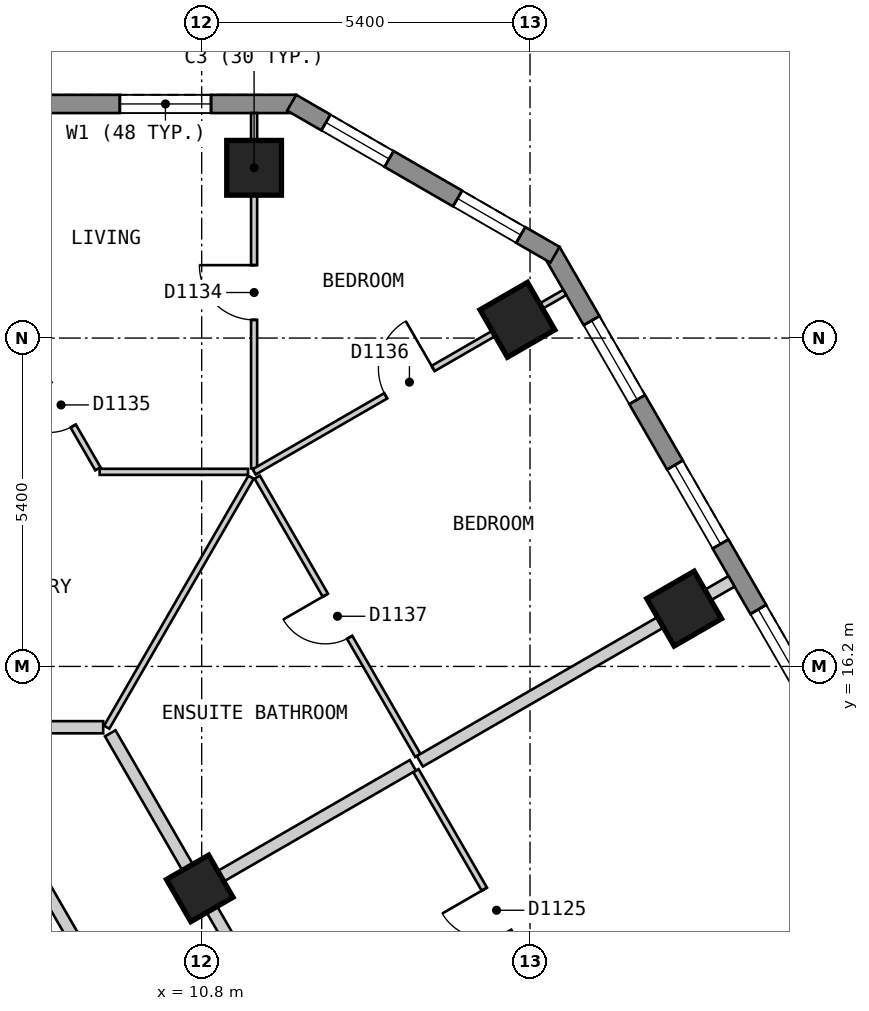
"""IFC4 building model, lengths in metres.
Left out: names, types, materials, properties, quantities, classifications, styles, units other than length and angle.
Written with IfcOpenShell. Run it as: python <this file> out.ifc"""

import sys

from ifc_helpers import new_model, si_unit, direction, frame, frame_2d, origin, origin_2d, place, context, subcontext, project, spatial, polyline, rectangle, outline, extrude, element, fill, save


model = new_model("IFC4")
c1 = context("Model", 3, precision=1e-05, world=origin(), true_north=direction((0.0, 1.0)))
c2 = subcontext(c1, "Body", "Model", "MODEL_VIEW")
j1 = project(units=[si_unit("LENGTHUNIT", "METRE"), si_unit("PLANEANGLEUNIT", "RADIAN")], contexts=[c1])
p1 = place(None, origin())
s1 = spatial("IfcSite", under=j1, at=p1, CompositionType="ELEMENT")
p2 = place(p1, origin())
s2 = spatial("IfcBuilding", under=s1, at=p2, CompositionType="ELEMENT")
p3 = place(p2, frame((0.0, 0.0, 144.6)))
s3 = spatial("IfcBuildingStorey", under=s2, at=p3, CompositionType="ELEMENT", Elevation=144.6)
for number, where, z_axis, x_axis in (
    (1, (11.662, 24.4, 0.0), (0.0, 0.0, 1.0), (-1.0, 0.0, 0.0)),
    (2, (18.735, 17.15, 0.0), (0.0, 0.0, 1.0), (-0.5, 0.866, 0.0)),
    (3, (15.993, 21.9, 0.0), (0.0, 0.0, 1.0), (-0.5, 0.866, 0.0)),
):
    element("IfcColumn", number, at=place(p3, frame(where, z_axis=z_axis, x_axis=x_axis)), inside=s3, PredefinedType="COLUMN", context=c2, shape_type="SweptSolid", body=[
        extrude(rectangle(XDim=0.9, YDim=0.9, at=origin_2d()), origin(), (0.0, 0.0, 1.0), 3.0),
    ])
p4 = place(p3, frame((10.768, 12.55, 0.0), z_axis=(0.0, 0.0, 1.0), x_axis=(-0.5, 0.866025403784, 0.0)))
e4 = element("IfcColumn", 4, at=p4, inside=s3, PredefinedType="COLUMN", context=c2, shape_type="SweptSolid", body=[
    extrude(rectangle(XDim=0.8, YDim=0.8, at=origin_2d()), origin(), (0.0, 0.0, 1.0), 3.0),
])
p5 = place(p3, frame((12.355, 25.45, 0.0), z_axis=(0.0, 0.0, 1.0), x_axis=(-1.0, 0.0, 0.0)))
e5 = element("IfcWall", 5, at=p5, inside=s3, PredefinedType="SOLIDWALL", context=c2, shape_type="SweptSolid", body=[
    extrude(outline(polyline([(0.0, -0.15), (24.71, -0.15), (24.63, 0.15), (0.08, 0.15), (0.0, -0.15)])), origin(), (0.0, 0.0, 1.0), 2.7),
])
p6 = place(p5, frame((1.401, 0.0, 0.15)))
e6 = element("IfcOpeningElement", 6, at=p6, cuts=e5, PredefinedType="OPENING", context=c2, shape_type="SweptSolid", body=[
    extrude(rectangle(XDim=1.5, YDim=2.1, at=frame_2d((0.75, 1.05))), frame((0.0, 0.16, 0.0), z_axis=(0.0, -1.0, 0.0), x_axis=(1.0, 0.0, 0.0)), (0.0, 0.0, 1.0), 0.32),
])
p7 = place(p5, frame((4.316, 0.0, 0.15)))
e7 = element("IfcOpeningElement", 7, at=p7, cuts=e5, PredefinedType="OPENING", context=c2, shape_type="SweptSolid", body=[
    extrude(rectangle(XDim=1.5, YDim=2.1, at=frame_2d((0.75, 1.05))), frame((0.0, 0.16, 0.0), z_axis=(0.0, -1.0, 0.0), x_axis=(1.0, 0.0, 0.0)), (0.0, 0.0, 1.0), 0.32),
])
p8 = place(p5, frame((7.232, 0.0, 0.15)))
e8 = element("IfcOpeningElement", 8, at=p8, cuts=e5, PredefinedType="OPENING", context=c2, shape_type="SweptSolid", body=[
    extrude(rectangle(XDim=1.5, YDim=2.1, at=frame_2d((0.75, 1.05))), frame((0.0, 0.16, 0.0), z_axis=(0.0, -1.0, 0.0), x_axis=(1.0, 0.0, 0.0)), (0.0, 0.0, 1.0), 0.32),
])
p9 = place(p5, frame((10.147, 0.0, 0.15)))
e9 = element("IfcOpeningElement", 9, at=p9, cuts=e5, PredefinedType="OPENING", context=c2, shape_type="SweptSolid", body=[
    extrude(rectangle(XDim=1.5, YDim=2.1, at=frame_2d((0.75, 1.05))), frame((0.0, 0.16, 0.0), z_axis=(0.0, -1.0, 0.0), x_axis=(1.0, 0.0, 0.0)), (0.0, 0.0, 1.0), 0.32),
])
p10 = place(p5, frame((13.063, 0.0, 0.15)))
e10 = element("IfcOpeningElement", 10, at=p10, cuts=e5, PredefinedType="OPENING", context=c2, shape_type="SweptSolid", body=[
    extrude(rectangle(XDim=1.5, YDim=2.1, at=frame_2d((0.75, 1.05))), frame((0.0, 0.16, 0.0), z_axis=(0.0, -1.0, 0.0), x_axis=(1.0, 0.0, 0.0)), (0.0, 0.0, 1.0), 0.32),
])
p11 = place(p5, frame((15.978, 0.0, 0.15)))
e11 = element("IfcOpeningElement", 11, at=p11, cuts=e5, PredefinedType="OPENING", context=c2, shape_type="SweptSolid", body=[
    extrude(rectangle(XDim=1.5, YDim=2.1, at=frame_2d((0.75, 1.05))), frame((0.0, 0.16, 0.0), z_axis=(0.0, -1.0, 0.0), x_axis=(1.0, 0.0, 0.0)), (0.0, 0.0, 1.0), 0.32),
])
p12 = place(p5, frame((18.894, 0.0, 0.15)))
e12 = element("IfcOpeningElement", 12, at=p12, cuts=e5, PredefinedType="OPENING", context=c2, shape_type="SweptSolid", body=[
    extrude(rectangle(XDim=1.5, YDim=2.1, at=frame_2d((0.75, 1.05))), frame((0.0, 0.16, 0.0), z_axis=(0.0, -1.0, 0.0), x_axis=(1.0, 0.0, 0.0)), (0.0, 0.0, 1.0), 0.32),
])
p13 = place(p5, frame((21.809, 0.0, 0.15)))
e13 = element("IfcOpeningElement", 13, at=p13, cuts=e5, PredefinedType="OPENING", context=c2, shape_type="SweptSolid", body=[
    extrude(rectangle(XDim=1.5, YDim=2.1, at=frame_2d((0.75, 1.05))), frame((0.0, 0.16, 0.0), z_axis=(0.0, -1.0, 0.0), x_axis=(1.0, 0.0, 0.0)), (0.0, 0.0, 1.0), 0.32),
])
p14 = place(p3, frame((28.218, 2.825, 0.0), z_axis=(0.0, 0.0, 1.0), x_axis=(-0.500020536353, 0.866013546791, 0.0)))
e14 = element("IfcWall", 14, at=p14, inside=s3, PredefinedType="SOLIDWALL", context=c2, shape_type="SweptSolid", body=[
    extrude(outline(polyline([(0.0, -0.15), (23.325, -0.15), (23.245, 0.15), (0.08, 0.15), (0.0, -0.15)])), origin(), (0.0, 0.0, 1.0), 2.7),
])
p15 = place(p14, frame((1.314, 0.0, 0.15)))
e15 = element("IfcOpeningElement", 15, at=p15, cuts=e14, PredefinedType="OPENING", context=c2, shape_type="SweptSolid", body=[
    extrude(rectangle(XDim=1.5, YDim=2.1, at=frame_2d((0.75, 1.05))), frame((0.0, 0.16, 0.0), z_axis=(0.0, -1.0, 0.0), x_axis=(1.0, 0.0, 0.0)), (0.0, 0.0, 1.0), 0.32),
])
p16 = place(p14, frame((4.056, 0.0, 0.15)))
e16 = element("IfcOpeningElement", 16, at=p16, cuts=e14, PredefinedType="OPENING", context=c2, shape_type="SweptSolid", body=[
    extrude(rectangle(XDim=1.5, YDim=2.1, at=frame_2d((0.75, 1.05))), frame((0.0, 0.16, 0.0), z_axis=(0.0, -1.0, 0.0), x_axis=(1.0, 0.0, 0.0)), (0.0, 0.0, 1.0), 0.32),
])
p17 = place(p14, frame((6.798, 0.0, 0.15)))
e17 = element("IfcOpeningElement", 17, at=p17, cuts=e14, PredefinedType="OPENING", context=c2, shape_type="SweptSolid", body=[
    extrude(rectangle(XDim=1.5, YDim=2.1, at=frame_2d((0.75, 1.05))), frame((0.0, 0.16, 0.0), z_axis=(0.0, -1.0, 0.0), x_axis=(1.0, 0.0, 0.0)), (0.0, 0.0, 1.0), 0.32),
])
p18 = place(p14, frame((9.541, 0.0, 0.15)))
e18 = element("IfcOpeningElement", 18, at=p18, cuts=e14, PredefinedType="OPENING", context=c2, shape_type="SweptSolid", body=[
    extrude(rectangle(XDim=1.5, YDim=2.1, at=frame_2d((0.75, 1.05))), frame((0.0, 0.16, 0.0), z_axis=(0.0, -1.0, 0.0), x_axis=(1.0, 0.0, 0.0)), (0.0, 0.0, 1.0), 0.32),
])
p19 = place(p14, frame((12.284, 0.0, 0.15)))
e19 = element("IfcOpeningElement", 19, at=p19, cuts=e14, PredefinedType="OPENING", context=c2, shape_type="SweptSolid", body=[
    extrude(rectangle(XDim=1.5, YDim=2.1, at=frame_2d((0.75, 1.05))), frame((0.0, 0.16, 0.0), z_axis=(0.0, -1.0, 0.0), x_axis=(1.0, 0.0, 0.0)), (0.0, 0.0, 1.0), 0.32),
])
p20 = place(p14, frame((15.027, 0.0, 0.15)))
e20 = element("IfcOpeningElement", 20, at=p20, cuts=e14, PredefinedType="OPENING", context=c2, shape_type="SweptSolid", body=[
    extrude(rectangle(XDim=1.5, YDim=2.1, at=frame_2d((0.75, 1.05))), frame((0.0, 0.16, 0.0), z_axis=(0.0, -1.0, 0.0), x_axis=(1.0, 0.0, 0.0)), (0.0, 0.0, 1.0), 0.32),
])
p21 = place(p14, frame((17.769, 0.0, 0.15)))
e21 = element("IfcOpeningElement", 21, at=p21, cuts=e14, PredefinedType="OPENING", context=c2, shape_type="SweptSolid", body=[
    extrude(rectangle(XDim=1.5, YDim=2.1, at=frame_2d((0.75, 1.05))), frame((0.0, 0.16, 0.0), z_axis=(0.0, -1.0, 0.0), x_axis=(1.0, 0.0, 0.0)), (0.0, 0.0, 1.0), 0.32),
])
p22 = place(p14, frame((20.511, 0.0, 0.15)))
e22 = element("IfcOpeningElement", 22, at=p22, cuts=e14, PredefinedType="OPENING", context=c2, shape_type="SweptSolid", body=[
    extrude(rectangle(XDim=1.5, YDim=2.1, at=frame_2d((0.75, 1.05))), frame((0.0, 0.16, 0.0), z_axis=(0.0, -1.0, 0.0), x_axis=(1.0, 0.0, 0.0)), (0.0, 0.0, 1.0), 0.32),
])
p23 = place(p3, frame((16.61, 22.97, 0.0), z_axis=(0.0, 0.0, 1.0), x_axis=(-0.866022959057, 0.500004234368, 0.0)))
e23 = element("IfcWall", 23, at=p23, inside=s3, PredefinedType="SOLIDWALL", context=c2, shape_type="SweptSolid", body=[
    extrude(outline(polyline([(0.0, -0.15), (5.0, -0.15), (4.92, 0.15), (0.08, 0.15), (0.0, -0.15)])), origin(), (0.0, 0.0, 1.0), 2.7),
])
p24 = place(p23, frame((0.65, 0.0, 0.15)))
e24 = element("IfcOpeningElement", 24, at=p24, cuts=e23, PredefinedType="OPENING", context=c2, shape_type="SweptSolid", body=[
    extrude(rectangle(XDim=1.2, YDim=2.1, at=frame_2d((0.6, 1.05))), frame((0.0, 0.16, 0.0), z_axis=(0.0, -1.0, 0.0), x_axis=(1.0, 0.0, 0.0)), (0.0, 0.0, 1.0), 0.32),
])
p25 = place(p23, frame((3.15, 0.0, 0.15)))
e25 = element("IfcOpeningElement", 25, at=p25, cuts=e23, PredefinedType="OPENING", context=c2, shape_type="SweptSolid", body=[
    extrude(rectangle(XDim=1.2, YDim=2.1, at=frame_2d((0.6, 1.05))), frame((0.0, 0.16, 0.0), z_axis=(0.0, -1.0, 0.0), x_axis=(1.0, 0.0, 0.0)), (0.0, 0.0, 1.0), 0.32),
])
p26 = place(p3, frame((7.967, 13.0, 0.0), z_axis=(0.0, 0.0, 1.0), x_axis=(0.50003774998, -0.866003607726, 0.0)))
e26 = element("IfcWall", 26, at=p26, inside=s3, PredefinedType="PARTITIONING", context=c2, shape_type="SweptSolid", body=[
    extrude(rectangle(XDim=14.433, YDim=0.2, at=frame_2d((7.217, 0.0))), origin(), (0.0, 0.0, 1.0), 2.7),
])
p27 = place(p26, frame((6.824, 0.0, 0.0)))
e27 = element("IfcOpeningElement", 27, at=p27, cuts=e26, PredefinedType="OPENING", context=c2, shape_type="SweptSolid", body=[
    extrude(rectangle(XDim=0.9, YDim=2.1, at=frame_2d((0.45, 1.05))), frame((0.0, 0.11, 0.0), z_axis=(0.0, -1.0, 0.0), x_axis=(1.0, 0.0, 0.0)), (0.0, 0.0, 1.0), 0.22),
])
p28 = place(p3, frame((9.296, 15.1, 0.0), z_axis=(0.0, 0.0, 1.0), x_axis=(0.499974024244, -0.866040400375, 0.0)))
e28 = element("IfcWall", 28, at=p28, inside=s3, PredefinedType="PARTITIONING", context=c2, shape_type="SweptSolid", body=[
    extrude(rectangle(XDim=16.857, YDim=0.2, at=frame_2d((8.429, 0.0))), origin(), (0.0, 0.0, 1.0), 2.7),
])
p29 = place(p28, frame((11.522, 0.0, 0.0)))
e29 = element("IfcOpeningElement", 29, at=p29, cuts=e28, PredefinedType="OPENING", context=c2, shape_type="SweptSolid", body=[
    extrude(rectangle(XDim=1.0, YDim=2.1, at=frame_2d((0.5, 1.05))), frame((0.0, 0.11, 0.0), z_axis=(0.0, -1.0, 0.0), x_axis=(1.0, 0.0, 0.0)), (0.0, 0.0, 1.0), 0.22),
])
p30 = place(p3, frame((6.697, 15.2, 0.0), z_axis=(0.0, 0.0, 1.0), x_axis=(1.0, 0.0, 0.0)))
e30 = element("IfcWall", 30, at=p30, inside=s3, PredefinedType="PARTITIONING", context=c2, shape_type="SweptSolid", body=[
    extrude(rectangle(XDim=2.483, YDim=0.2, at=frame_2d((1.241, 0.0))), origin(), (0.0, 0.0, 1.0), 2.7),
])
p31 = place(p3, frame((7.881, 21.55, 0.0), z_axis=(0.0, 0.0, 1.0), x_axis=(0.499821239653, -0.866128586522, 0.0)))
e31 = element("IfcWall", 31, at=p31, inside=s3, PredefinedType="PARTITIONING", context=c2, shape_type="SweptSolid", body=[
    extrude(rectangle(XDim=2.425, YDim=0.1, at=frame_2d((1.212, 0.0))), origin(), (0.0, 0.0, 1.0), 2.7),
])
p32 = place(p31, frame((0.812, 0.0, 0.0)))
e32 = element("IfcOpeningElement", 32, at=p32, cuts=e31, PredefinedType="OPENING", context=c2, shape_type="SweptSolid", body=[
    extrude(rectangle(XDim=0.8, YDim=2.1, at=frame_2d((0.4, 1.05))), frame((0.0, 0.06, 0.0), z_axis=(0.0, -1.0, 0.0), x_axis=(1.0, 0.0, 0.0)), (0.0, 0.0, 1.0), 0.12),
])
p33 = place(p3, frame((14.323, 14.487, 0.0), z_axis=(0.0, 0.0, 1.0), x_axis=(0.500011052545, -0.866019022501, 0.0)))
e33 = element("IfcWall", 33, at=p33, inside=s3, PredefinedType="PARTITIONING", context=c2, shape_type="SweptSolid", body=[
    extrude(rectangle(XDim=16.208, YDim=0.1, at=frame_2d((8.104, 0.0))), origin(), (0.0, 0.0, 1.0), 2.7),
])
p34 = place(p33, frame((8.484, 0.0, 0.0)))
e34 = element("IfcOpeningElement", 34, at=p34, cuts=e33, PredefinedType="OPENING", context=c2, shape_type="SweptSolid", body=[
    extrude(rectangle(XDim=0.9, YDim=2.1, at=frame_2d((0.45, 1.05))), frame((0.0, 0.06, 0.0), z_axis=(0.0, -1.0, 0.0), x_axis=(1.0, 0.0, 0.0)), (0.0, 0.0, 1.0), 0.12),
])
p35 = place(p33, frame((2.252, 0.0, 0.0)))
e35 = element("IfcOpeningElement", 35, at=p35, cuts=e33, PredefinedType="OPENING", context=c2, shape_type="SweptSolid", body=[
    extrude(rectangle(XDim=0.8, YDim=2.1, at=frame_2d((0.4, 1.05))), frame((0.0, 0.06, 0.0), z_axis=(0.0, -1.0, 0.0), x_axis=(1.0, 0.0, 0.0)), (0.0, 0.0, 1.0), 0.12),
])
p36 = place(p33, frame((13.167, 0.0, 0.0)))
e36 = element("IfcOpeningElement", 36, at=p36, cuts=e33, PredefinedType="OPENING", context=c2, shape_type="SweptSolid", body=[
    extrude(rectangle(XDim=0.8, YDim=2.1, at=frame_2d((0.4, 1.05))), frame((0.0, 0.06, 0.0), z_axis=(0.0, -1.0, 0.0), x_axis=(1.0, 0.0, 0.0)), (0.0, 0.0, 1.0), 0.12),
])
p37 = place(p3, frame((11.713, 19.313, 0.0), z_axis=(0.0, 0.0, 1.0), x_axis=(0.499945064984, -0.866057118208, 0.0)))
e37 = element("IfcWall", 37, at=p37, inside=s3, PredefinedType="PARTITIONING", context=c2, shape_type="SweptSolid", body=[
    extrude(rectangle(XDim=5.285, YDim=0.1, at=frame_2d((2.642, 0.0))), origin(), (0.0, 0.0, 1.0), 2.7),
])
p38 = place(p37, frame((2.242, 0.0, 0.0)))
e38 = element("IfcOpeningElement", 38, at=p38, cuts=e37, PredefinedType="OPENING", context=c2, shape_type="SweptSolid", body=[
    extrude(rectangle(XDim=0.8, YDim=2.1, at=frame_2d((0.4, 1.05))), frame((0.0, 0.06, 0.0), z_axis=(0.0, -1.0, 0.0), x_axis=(1.0, 0.0, 0.0)), (0.0, 0.0, 1.0), 0.12),
])
p39 = place(p3, frame((9.122, 19.4, 0.0), z_axis=(0.0, 0.0, 1.0), x_axis=(1.0, 0.0, 0.0)))
e39 = element("IfcWall", 39, at=p39, inside=s3, PredefinedType="PARTITIONING", context=c2, shape_type="SweptSolid", body=[
    extrude(rectangle(XDim=2.44, YDim=0.1, at=frame_2d((1.22, 0.0))), origin(), (0.0, 0.0, 1.0), 2.7),
])
p40 = place(p3, frame((9.238, 15.2, 0.0), z_axis=(0.0, 0.0, 1.0), x_axis=(0.499988022762, 0.866032318735, 0.0)))
e40 = element("IfcWall", 40, at=p40, inside=s3, PredefinedType="PARTITIONING", context=c2, shape_type="SweptSolid", body=[
    extrude(rectangle(XDim=4.748, YDim=0.1, at=frame_2d((2.374, 0.0))), origin(), (0.0, 0.0, 1.0), 2.7),
])
p41 = place(p3, frame((11.662, 19.456, 0.0), z_axis=(0.0, 0.0, 1.0), x_axis=(0.0, 1.0, 0.0)))
e41 = element("IfcWall", 41, at=p41, inside=s3, PredefinedType="PARTITIONING", context=c2, shape_type="SweptSolid", body=[
    extrude(rectangle(XDim=5.844, YDim=0.1, at=frame_2d((2.922, 0.0))), origin(), (0.0, 0.0, 1.0), 2.7),
])
p42 = place(p41, frame((2.443, 0.0, 0.0)))
e42 = element("IfcOpeningElement", 42, at=p42, cuts=e41, PredefinedType="OPENING", context=c2, shape_type="SweptSolid", body=[
    extrude(rectangle(XDim=0.9, YDim=2.1, at=frame_2d((0.45, 1.05))), frame((0.0, 0.06, 0.0), z_axis=(0.0, -1.0, 0.0), x_axis=(1.0, 0.0, 0.0)), (0.0, 0.0, 1.0), 0.12),
])
p43 = place(p3, frame((11.663, 19.4, 0.0), z_axis=(0.0, 0.0, 1.0), x_axis=(0.865941558533, 0.500145196124, 0.0)))
e43 = element("IfcWall", 43, at=p43, inside=s3, PredefinedType="PARTITIONING", context=c2, shape_type="SweptSolid", body=[
    extrude(rectangle(XDim=5.899, YDim=0.1, at=frame_2d((2.949, 0.0))), origin(), (0.0, 0.0, 1.0), 2.7),
])
p44 = place(p43, frame((2.499, 0.0, 0.0)))
e44 = element("IfcOpeningElement", 44, at=p44, cuts=e43, PredefinedType="OPENING", context=c2, shape_type="SweptSolid", body=[
    extrude(rectangle(XDim=0.9, YDim=2.1, at=frame_2d((0.45, 1.05))), frame((0.0, 0.06, 0.0), z_axis=(0.0, -1.0, 0.0), x_axis=(1.0, 0.0, 0.0)), (0.0, 0.0, 1.0), 0.12),
])
p45 = place(p3, frame((10.854, 12.6, 0.0), z_axis=(0.0, 0.0, 1.0), x_axis=(0.866031112038, 0.499990112884, 0.0)))
e45 = element("IfcWall", 45, at=p45, inside=s3, PredefinedType="PARTITIONING", context=c2, shape_type="SweptSolid", body=[
    extrude(rectangle(XDim=3.948, YDim=0.2, at=frame_2d((1.974, 0.0))), origin(), (0.0, 0.0, 1.0), 2.7),
])
p46 = place(p3, frame((14.388, 14.64, 0.0), z_axis=(0.0, 0.0, 1.0), x_axis=(0.866044090212, 0.499967632761, 0.0)))
e46 = element("IfcWall", 46, at=p46, inside=s3, PredefinedType="PARTITIONING", context=c2, shape_type="SweptSolid", body=[
    extrude(rectangle(XDim=5.919, YDim=0.2, at=frame_2d((2.959, 0.0))), origin(), (0.0, 0.0, 1.0), 2.7),
])
p47 = place(p6, origin())
e47 = element("IfcWindow", 47, at=p47, inside=s3, PartitioningType="SINGLE_PANEL", PredefinedType="WINDOW", context=c2, shape_type="SweptSolid", body=[
    extrude(rectangle(XDim=1.5, YDim=2.1, at=frame_2d((0.75, 1.05))), frame((0.0, 0.03, 0.0), z_axis=(0.0, -1.0, 0.0), x_axis=(1.0, 0.0, 0.0)), (0.0, 0.0, 1.0), 0.06),
])
fill(e6, e47)
p48 = place(p20, origin())
e48 = element("IfcWindow", 48, at=p48, inside=s3, PartitioningType="SINGLE_PANEL", PredefinedType="WINDOW", context=c2, shape_type="SweptSolid", body=[
    extrude(rectangle(XDim=1.5, YDim=2.1, at=frame_2d((0.75, 1.05))), frame((0.0, 0.03, 0.0), z_axis=(0.0, -1.0, 0.0), x_axis=(1.0, 0.0, 0.0)), (0.0, 0.0, 1.0), 0.06),
])
fill(e20, e48)
p49 = place(p21, origin())
e49 = element("IfcWindow", 49, at=p49, inside=s3, PartitioningType="SINGLE_PANEL", PredefinedType="WINDOW", context=c2, shape_type="SweptSolid", body=[
    extrude(rectangle(XDim=1.5, YDim=2.1, at=frame_2d((0.75, 1.05))), frame((0.0, 0.03, 0.0), z_axis=(0.0, -1.0, 0.0), x_axis=(1.0, 0.0, 0.0)), (0.0, 0.0, 1.0), 0.06),
])
fill(e21, e49)
p50 = place(p22, origin())
e50 = element("IfcWindow", 50, at=p50, inside=s3, PartitioningType="SINGLE_PANEL", PredefinedType="WINDOW", context=c2, shape_type="SweptSolid", body=[
    extrude(rectangle(XDim=1.5, YDim=2.1, at=frame_2d((0.75, 1.05))), frame((0.0, 0.03, 0.0), z_axis=(0.0, -1.0, 0.0), x_axis=(1.0, 0.0, 0.0)), (0.0, 0.0, 1.0), 0.06),
])
fill(e22, e50)
p51 = place(p24, origin())
e51 = element("IfcWindow", 51, at=p51, inside=s3, PartitioningType="SINGLE_PANEL", PredefinedType="WINDOW", context=c2, shape_type="SweptSolid", body=[
    extrude(rectangle(XDim=1.2, YDim=2.1, at=frame_2d((0.6, 1.05))), frame((0.0, 0.03, 0.0), z_axis=(0.0, -1.0, 0.0), x_axis=(1.0, 0.0, 0.0)), (0.0, 0.0, 1.0), 0.06),
])
fill(e24, e51)
p52 = place(p25, origin())
e52 = element("IfcWindow", 52, at=p52, inside=s3, PartitioningType="SINGLE_PANEL", PredefinedType="WINDOW", context=c2, shape_type="SweptSolid", body=[
    extrude(rectangle(XDim=1.2, YDim=2.1, at=frame_2d((0.6, 1.05))), frame((0.0, 0.03, 0.0), z_axis=(0.0, -1.0, 0.0), x_axis=(1.0, 0.0, 0.0)), (0.0, 0.0, 1.0), 0.06),
])
fill(e25, e52)
p53 = place(p35, origin())
e53 = element("IfcDoor", 53, at=p53, inside=s3, OperationType="SINGLE_SWING_LEFT", PredefinedType="DOOR", context=c2, shape_type="SweptSolid", body=[
    extrude(rectangle(XDim=0.8, YDim=2.1, at=frame_2d((0.4, 1.05))), frame((0.0, 0.025, 0.0), z_axis=(0.0, -1.0, 0.0), x_axis=(1.0, 0.0, 0.0)), (0.0, 0.0, 1.0), 0.05),
])
fill(e35, e53)
p54 = place(p42, origin())
e54 = element("IfcDoor", 54, at=p54, inside=s3, OperationType="SINGLE_SWING_RIGHT", PredefinedType="DOOR", context=c2, shape_type="SweptSolid", body=[
    extrude(rectangle(XDim=0.9, YDim=2.1, at=frame_2d((0.45, 1.05))), frame((0.0, 0.025, 0.0), z_axis=(0.0, -1.0, 0.0), x_axis=(1.0, 0.0, 0.0)), (0.0, 0.0, 1.0), 0.05),
])
fill(e42, e54)
p55 = place(p32, origin())
e55 = element("IfcDoor", 55, at=p55, inside=s3, OperationType="SINGLE_SWING_LEFT", PredefinedType="DOOR", context=c2, shape_type="SweptSolid", body=[
    extrude(rectangle(XDim=0.8, YDim=2.1, at=frame_2d((0.4, 1.05))), frame((0.0, 0.025, 0.0), z_axis=(0.0, -1.0, 0.0), x_axis=(1.0, 0.0, 0.0)), (0.0, 0.0, 1.0), 0.05),
])
fill(e32, e55)
p56 = place(p44, origin())
e56 = element("IfcDoor", 56, at=p56, inside=s3, OperationType="SINGLE_SWING_RIGHT", PredefinedType="DOOR", context=c2, shape_type="SweptSolid", body=[
    extrude(rectangle(XDim=0.9, YDim=2.1, at=frame_2d((0.45, 1.05))), frame((0.0, 0.025, 0.0), z_axis=(0.0, -1.0, 0.0), x_axis=(1.0, 0.0, 0.0)), (0.0, 0.0, 1.0), 0.05),
])
fill(e44, e56)
p57 = place(p38, origin())
e57 = element("IfcDoor", 57, at=p57, inside=s3, OperationType="SINGLE_SWING_LEFT", PredefinedType="DOOR", context=c2, shape_type="SweptSolid", body=[
    extrude(rectangle(XDim=0.8, YDim=2.1, at=frame_2d((0.4, 1.05))), frame((0.0, 0.025, 0.0), z_axis=(0.0, -1.0, 0.0), x_axis=(1.0, 0.0, 0.0)), (0.0, 0.0, 1.0), 0.05),
])
fill(e38, e57)
save(model, sys.argv[1])
